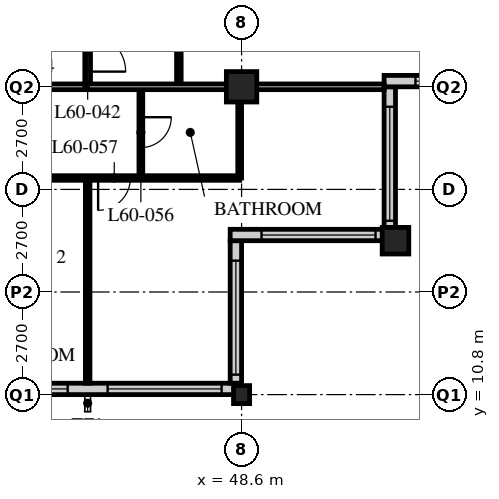
"""IFC4 building model, lengths in metres.
Left out: names, types, materials, properties, quantities, classifications, styles, units other than length and angle.
Written with IfcOpenShell. Run it as: python <this file> out.ifc"""

import sys

from ifc_helpers import new_model, si_unit, direction, frame, frame_2d, origin, origin_2d, place, context, subcontext, project, spatial, rectangle, hollow_rectangle, i_section, extrude, element, fill, save


model = new_model("IFC4")
c1 = context("Model", 3, precision=1e-05, world=origin(), true_north=direction((0.0, 1.0)))
c2 = subcontext(c1, "Body", "Model", "MODEL_VIEW")
j1 = project(units=[si_unit("LENGTHUNIT", "METRE"), si_unit("PLANEANGLEUNIT", "RADIAN")], contexts=[c1])
p1 = place(None, origin())
s1 = spatial("IfcSite", under=j1, at=p1, CompositionType="ELEMENT")
p2 = place(p1, origin())
s2 = spatial("IfcBuilding", under=s1, at=p2, CompositionType="ELEMENT")
p3 = place(p2, frame((0.0, 0.0, 231.6)))
s3 = spatial("IfcBuildingStorey", under=s2, at=p3, CompositionType="ELEMENT", Elevation=231.6)
p4 = place(p3, frame((48.6, 10.8, 0.0), z_axis=(0.0, 0.0, 1.0), x_axis=(1.0, 0.0, 0.0)))
e1 = element("IfcColumn", 1, at=p4, inside=s3, PredefinedType="COLUMN", context=c2, shape_type="SweptSolid", body=[
    extrude(i_section(OverallWidth=0.424, OverallDepth=0.475, WebThickness=0.048, FlangeThickness=0.077, FilletRadius=0.015, at=origin_2d()), origin(), (0.0, 0.0, 1.0), 3.6),
])
p5 = place(p3, frame((48.6, 18.9, 0.0), z_axis=(0.0, 0.0, 1.0), x_axis=(1.0, 0.0, 0.0)))
e2 = element("IfcColumn", 2, at=p5, inside=s3, PredefinedType="COLUMN", context=c2, shape_type="SweptSolid", body=[
    extrude(hollow_rectangle(XDim=0.8, YDim=0.8, WallThickness=0.08, at=origin_2d()), origin(), (0.0, 0.0, 1.0), 3.6),
])
p6 = place(p3, frame((52.65, 14.85, 0.0), z_axis=(0.0, 0.0, 1.0), x_axis=(1.0, 0.0, 0.0)))
e3 = element("IfcColumn", 3, at=p6, inside=s3, PredefinedType="COLUMN", context=c2, shape_type="SweptSolid", body=[
    extrude(hollow_rectangle(XDim=0.7, YDim=0.7, WallThickness=0.07, at=origin_2d()), origin(), (0.0, 0.0, 1.0), 3.6),
])
p7 = place(p3, frame((8.4, 10.95, 0.0), z_axis=(0.0, 0.0, 1.0), x_axis=(1.0, 0.0, 0.0)))
e4 = element("IfcWall", 4, at=p7, inside=s3, PredefinedType="SOLIDWALL", context=c2, shape_type="SweptSolid", body=[
    extrude(rectangle(XDim=40.2, YDim=0.3, at=frame_2d((20.1, 0.0))), origin(), (0.0, 0.0, 1.0), 2.35),
])
p8 = place(p7, frame((0.225, 0.0, 0.6)))
e5 = element("IfcOpeningElement", 5, at=p8, cuts=e4, PredefinedType="OPENING", context=c2, shape_type="SweptSolid", body=[
    extrude(rectangle(XDim=3.0, YDim=1.7, at=frame_2d((1.5, 0.85))), frame((0.0, 0.16, 0.0), z_axis=(0.0, -1.0, 0.0), x_axis=(1.0, 0.0, 0.0)), (0.0, 0.0, 1.0), 0.32),
])
p9 = place(p7, frame((4.275, 0.0, 0.6)))
e6 = element("IfcOpeningElement", 6, at=p9, cuts=e4, PredefinedType="OPENING", context=c2, shape_type="SweptSolid", body=[
    extrude(rectangle(XDim=3.0, YDim=1.7, at=frame_2d((1.5, 0.85))), frame((0.0, 0.16, 0.0), z_axis=(0.0, -1.0, 0.0), x_axis=(1.0, 0.0, 0.0)), (0.0, 0.0, 1.0), 0.32),
])
p10 = place(p7, frame((8.325, 0.0, 0.6)))
e7 = element("IfcOpeningElement", 7, at=p10, cuts=e4, PredefinedType="OPENING", context=c2, shape_type="SweptSolid", body=[
    extrude(rectangle(XDim=3.0, YDim=1.7, at=frame_2d((1.5, 0.85))), frame((0.0, 0.16, 0.0), z_axis=(0.0, -1.0, 0.0), x_axis=(1.0, 0.0, 0.0)), (0.0, 0.0, 1.0), 0.32),
])
p11 = place(p7, frame((12.375, 0.0, 0.6)))
e8 = element("IfcOpeningElement", 8, at=p11, cuts=e4, PredefinedType="OPENING", context=c2, shape_type="SweptSolid", body=[
    extrude(rectangle(XDim=3.0, YDim=1.7, at=frame_2d((1.5, 0.85))), frame((0.0, 0.16, 0.0), z_axis=(0.0, -1.0, 0.0), x_axis=(1.0, 0.0, 0.0)), (0.0, 0.0, 1.0), 0.32),
])
p12 = place(p7, frame((16.425, 0.0, 0.6)))
e9 = element("IfcOpeningElement", 9, at=p12, cuts=e4, PredefinedType="OPENING", context=c2, shape_type="SweptSolid", body=[
    extrude(rectangle(XDim=3.0, YDim=1.7, at=frame_2d((1.5, 0.85))), frame((0.0, 0.16, 0.0), z_axis=(0.0, -1.0, 0.0), x_axis=(1.0, 0.0, 0.0)), (0.0, 0.0, 1.0), 0.32),
])
p13 = place(p7, frame((20.475, 0.0, 0.6)))
e10 = element("IfcOpeningElement", 10, at=p13, cuts=e4, PredefinedType="OPENING", context=c2, shape_type="SweptSolid", body=[
    extrude(rectangle(XDim=3.0, YDim=1.7, at=frame_2d((1.5, 0.85))), frame((0.0, 0.16, 0.0), z_axis=(0.0, -1.0, 0.0), x_axis=(1.0, 0.0, 0.0)), (0.0, 0.0, 1.0), 0.32),
])
p14 = place(p7, frame((24.525, 0.0, 0.6)))
e11 = element("IfcOpeningElement", 11, at=p14, cuts=e4, PredefinedType="OPENING", context=c2, shape_type="SweptSolid", body=[
    extrude(rectangle(XDim=3.0, YDim=1.7, at=frame_2d((1.5, 0.85))), frame((0.0, 0.16, 0.0), z_axis=(0.0, -1.0, 0.0), x_axis=(1.0, 0.0, 0.0)), (0.0, 0.0, 1.0), 0.32),
])
p15 = place(p7, frame((28.575, 0.0, 0.6)))
e12 = element("IfcOpeningElement", 12, at=p15, cuts=e4, PredefinedType="OPENING", context=c2, shape_type="SweptSolid", body=[
    extrude(rectangle(XDim=3.0, YDim=1.7, at=frame_2d((1.5, 0.85))), frame((0.0, 0.16, 0.0), z_axis=(0.0, -1.0, 0.0), x_axis=(1.0, 0.0, 0.0)), (0.0, 0.0, 1.0), 0.32),
])
p16 = place(p7, frame((32.625, 0.0, 0.6)))
e13 = element("IfcOpeningElement", 13, at=p16, cuts=e4, PredefinedType="OPENING", context=c2, shape_type="SweptSolid", body=[
    extrude(rectangle(XDim=3.0, YDim=1.7, at=frame_2d((1.5, 0.85))), frame((0.0, 0.16, 0.0), z_axis=(0.0, -1.0, 0.0), x_axis=(1.0, 0.0, 0.0)), (0.0, 0.0, 1.0), 0.32),
])
p17 = place(p7, frame((36.675, 0.0, 0.6)))
e14 = element("IfcOpeningElement", 14, at=p17, cuts=e4, PredefinedType="OPENING", context=c2, shape_type="SweptSolid", body=[
    extrude(rectangle(XDim=3.0, YDim=1.7, at=frame_2d((1.5, 0.85))), frame((0.0, 0.16, 0.0), z_axis=(0.0, -1.0, 0.0), x_axis=(1.0, 0.0, 0.0)), (0.0, 0.0, 1.0), 0.32),
])
p18 = place(p3, frame((48.45, 11.1, 0.0), z_axis=(0.0, 0.0, 1.0), x_axis=(0.0, 1.0, 0.0)))
e15 = element("IfcWall", 15, at=p18, inside=s3, PredefinedType="SOLIDWALL", context=c2, shape_type="SweptSolid", body=[
    extrude(rectangle(XDim=3.75, YDim=0.3, at=frame_2d((1.875, 0.0))), origin(), (0.0, 0.0, 1.0), 2.35),
])
p19 = place(p18, frame((0.225, 0.0, 0.6)))
e16 = element("IfcOpeningElement", 16, at=p19, cuts=e15, PredefinedType="OPENING", context=c2, shape_type="SweptSolid", body=[
    extrude(rectangle(XDim=3.0, YDim=1.7, at=frame_2d((1.5, 0.85))), frame((0.0, 0.16, 0.0), z_axis=(0.0, -1.0, 0.0), x_axis=(1.0, 0.0, 0.0)), (0.0, 0.0, 1.0), 0.32),
])
p20 = place(p3, frame((48.3, 15.0, 0.0), z_axis=(0.0, 0.0, 1.0), x_axis=(1.0, 0.0, 0.0)))
e17 = element("IfcWall", 17, at=p20, inside=s3, PredefinedType="SOLIDWALL", context=c2, shape_type="SweptSolid", body=[
    extrude(rectangle(XDim=4.35, YDim=0.3, at=frame_2d((2.175, 0.0))), origin(), (0.0, 0.0, 1.0), 2.65),
])
p21 = place(p20, frame((0.825, 0.0, 0.6)))
e18 = element("IfcOpeningElement", 18, at=p21, cuts=e17, PredefinedType="OPENING", context=c2, shape_type="SweptSolid", body=[
    extrude(rectangle(XDim=3.0, YDim=1.7, at=frame_2d((1.5, 0.85))), frame((0.0, 0.16, 0.0), z_axis=(0.0, -1.0, 0.0), x_axis=(1.0, 0.0, 0.0)), (0.0, 0.0, 1.0), 0.32),
])
p22 = place(p3, frame((52.5, 15.15, 0.0), z_axis=(0.0, 0.0, 1.0), x_axis=(0.0, 1.0, 0.0)))
e19 = element("IfcWall", 19, at=p22, inside=s3, PredefinedType="SOLIDWALL", context=c2, shape_type="SweptSolid", body=[
    extrude(rectangle(XDim=3.75, YDim=0.3, at=frame_2d((1.875, 0.0))), origin(), (0.0, 0.0, 1.0), 2.65),
])
p23 = place(p22, frame((0.225, 0.0, 0.6)))
e20 = element("IfcOpeningElement", 20, at=p23, cuts=e19, PredefinedType="OPENING", context=c2, shape_type="SweptSolid", body=[
    extrude(rectangle(XDim=3.0, YDim=1.7, at=frame_2d((1.5, 0.85))), frame((0.0, 0.16, 0.0), z_axis=(0.0, -1.0, 0.0), x_axis=(1.0, 0.0, 0.0)), (0.0, 0.0, 1.0), 0.32),
])
p24 = place(p3, frame((52.35, 19.05, 0.0), z_axis=(0.0, 0.0, 1.0), x_axis=(1.0, 0.0, 0.0)))
e21 = element("IfcWall", 21, at=p24, inside=s3, PredefinedType="SOLIDWALL", context=c2, shape_type="SweptSolid", body=[
    extrude(rectangle(XDim=4.35, YDim=0.3, at=frame_2d((2.175, 0.0))), origin(), (0.0, 0.0, 1.0), 2.35),
])
p25 = place(p24, frame((0.825, 0.0, 0.6)))
e22 = element("IfcOpeningElement", 22, at=p25, cuts=e21, PredefinedType="OPENING", context=c2, shape_type="SweptSolid", body=[
    extrude(rectangle(XDim=3.0, YDim=1.7, at=frame_2d((1.5, 0.85))), frame((0.0, 0.16, 0.0), z_axis=(0.0, -1.0, 0.0), x_axis=(1.0, 0.0, 0.0)), (0.0, 0.0, 1.0), 0.32),
])
p26 = place(p3, frame((8.1, 18.9, 0.0), z_axis=(0.0, 0.0, 1.0), x_axis=(1.0, 0.0, 0.0)))
e23 = element("IfcWall", 23, at=p26, inside=s3, PredefinedType="PARTITIONING", context=c2, shape_type="SweptSolid", body=[
    extrude(rectangle(XDim=36.45, YDim=0.15, at=frame_2d((18.225, 0.0))), origin(), (0.0, 0.0, 1.0), 2.35),
])
p27 = place(p26, frame((4.45, 0.0, 0.0)))
e24 = element("IfcOpeningElement", 24, at=p27, cuts=e23, PredefinedType="OPENING", context=c2, shape_type="SweptSolid", body=[
    extrude(rectangle(XDim=1.0, YDim=2.1, at=frame_2d((0.5, 1.05))), frame((0.0, 0.085, 0.0), z_axis=(0.0, -1.0, 0.0), x_axis=(1.0, 0.0, 0.0)), (0.0, 0.0, 1.0), 0.17),
])
p28 = place(p26, frame((17.1, 0.0, 0.0)))
e25 = element("IfcOpeningElement", 25, at=p28, cuts=e23, PredefinedType="OPENING", context=c2, shape_type="SweptSolid", body=[
    extrude(rectangle(XDim=1.0, YDim=2.1, at=frame_2d((0.5, 1.05))), frame((0.0, 0.085, 0.0), z_axis=(0.0, -1.0, 0.0), x_axis=(1.0, 0.0, 0.0)), (0.0, 0.0, 1.0), 0.17),
])
p29 = place(p26, frame((29.05, 0.0, 0.0)))
e26 = element("IfcOpeningElement", 26, at=p29, cuts=e23, PredefinedType="OPENING", context=c2, shape_type="SweptSolid", body=[
    extrude(rectangle(XDim=1.0, YDim=2.1, at=frame_2d((0.5, 1.05))), frame((0.0, 0.085, 0.0), z_axis=(0.0, -1.0, 0.0), x_axis=(1.0, 0.0, 0.0)), (0.0, 0.0, 1.0), 0.17),
])
p30 = place(p26, frame((2.625, 0.0, 0.0)))
e27 = element("IfcOpeningElement", 27, at=p30, cuts=e23, PredefinedType="OPENING", context=c2, shape_type="SweptSolid", body=[
    extrude(rectangle(XDim=1.0, YDim=2.1, at=frame_2d((0.5, 1.05))), frame((0.0, 0.085, 0.0), z_axis=(0.0, -1.0, 0.0), x_axis=(1.0, 0.0, 0.0)), (0.0, 0.0, 1.0), 0.17),
])
p31 = place(p26, frame((33.925, 0.0, 0.0)))
e28 = element("IfcOpeningElement", 28, at=p31, cuts=e23, PredefinedType="OPENING", context=c2, shape_type="SweptSolid", body=[
    extrude(rectangle(XDim=1.0, YDim=2.1, at=frame_2d((0.5, 1.05))), frame((0.0, 0.085, 0.0), z_axis=(0.0, -1.0, 0.0), x_axis=(1.0, 0.0, 0.0)), (0.0, 0.0, 1.0), 0.17),
])
p32 = place(p3, frame((44.55, 18.9, 0.0), z_axis=(0.0, 0.0, 1.0), x_axis=(0.0, 1.0, 0.0)))
e29 = element("IfcWall", 29, at=p32, inside=s3, PredefinedType="PARTITIONING", context=c2, shape_type="SweptSolid", body=[
    extrude(rectangle(XDim=24.3, YDim=0.15, at=frame_2d((12.15, 0.0))), origin(), (0.0, 0.0, 1.0), 3.35),
])
p33 = place(p32, frame((0.4, 0.0, 0.0)))
e30 = element("IfcOpeningElement", 30, at=p33, cuts=e29, PredefinedType="OPENING", context=c2, shape_type="SweptSolid", body=[
    extrude(rectangle(XDim=1.0, YDim=2.1, at=frame_2d((0.5, 1.05))), frame((0.0, 0.085, 0.0), z_axis=(0.0, -1.0, 0.0), x_axis=(1.0, 0.0, 0.0)), (0.0, 0.0, 1.0), 0.17),
])
p34 = place(p32, frame((16.6, 0.0, 0.0)))
e31 = element("IfcOpeningElement", 31, at=p34, cuts=e29, PredefinedType="OPENING", context=c2, shape_type="SweptSolid", body=[
    extrude(rectangle(XDim=1.0, YDim=2.1, at=frame_2d((0.5, 1.05))), frame((0.0, 0.085, 0.0), z_axis=(0.0, -1.0, 0.0), x_axis=(1.0, 0.0, 0.0)), (0.0, 0.0, 1.0), 0.17),
])
p35 = place(p3, frame((46.95, 18.9, 0.0), z_axis=(0.0, 0.0, 1.0), x_axis=(0.0, 1.0, 0.0)))
e32 = element("IfcWall", 32, at=p35, inside=s3, PredefinedType="PARTITIONING", context=c2, shape_type="SweptSolid", body=[
    extrude(rectangle(XDim=24.3, YDim=0.12, at=frame_2d((12.15, 0.0))), origin(), (0.0, 0.0, 1.0), 3.35),
])
p36 = place(p35, frame((0.975, 0.0, 0.0)))
e33 = element("IfcOpeningElement", 33, at=p36, cuts=e32, PredefinedType="OPENING", context=c2, shape_type="SweptSolid", body=[
    extrude(rectangle(XDim=0.85, YDim=2.1, at=frame_2d((0.425, 1.05))), frame((0.0, 0.07, 0.0), z_axis=(0.0, -1.0, 0.0), x_axis=(1.0, 0.0, 0.0)), (0.0, 0.0, 1.0), 0.14),
])
p37 = place(p35, frame((8.425, 0.0, 0.0)))
e34 = element("IfcOpeningElement", 34, at=p37, cuts=e32, PredefinedType="OPENING", context=c2, shape_type="SweptSolid", body=[
    extrude(rectangle(XDim=0.85, YDim=2.1, at=frame_2d((0.425, 1.05))), frame((0.0, 0.07, 0.0), z_axis=(0.0, -1.0, 0.0), x_axis=(1.0, 0.0, 0.0)), (0.0, 0.0, 1.0), 0.14),
])
p38 = place(p35, frame((12.475, 0.0, 0.0)))
e35 = element("IfcOpeningElement", 35, at=p38, cuts=e32, PredefinedType="OPENING", context=c2, shape_type="SweptSolid", body=[
    extrude(rectangle(XDim=0.85, YDim=2.1, at=frame_2d((0.425, 1.05))), frame((0.0, 0.07, 0.0), z_axis=(0.0, -1.0, 0.0), x_axis=(1.0, 0.0, 0.0)), (0.0, 0.0, 1.0), 0.14),
])
p39 = place(p35, frame((17.175, 0.0, 0.0)))
e36 = element("IfcOpeningElement", 36, at=p39, cuts=e32, PredefinedType="OPENING", context=c2, shape_type="SweptSolid", body=[
    extrude(rectangle(XDim=0.85, YDim=2.1, at=frame_2d((0.425, 1.05))), frame((0.0, 0.07, 0.0), z_axis=(0.0, -1.0, 0.0), x_axis=(1.0, 0.0, 0.0)), (0.0, 0.0, 1.0), 0.14),
])
p40 = place(p35, frame((20.575, 0.0, 0.0)))
e37 = element("IfcOpeningElement", 37, at=p40, cuts=e32, PredefinedType="OPENING", context=c2, shape_type="SweptSolid", body=[
    extrude(rectangle(XDim=0.85, YDim=2.1, at=frame_2d((0.425, 1.05))), frame((0.0, 0.07, 0.0), z_axis=(0.0, -1.0, 0.0), x_axis=(1.0, 0.0, 0.0)), (0.0, 0.0, 1.0), 0.14),
])
p41 = place(p3, frame((40.5, 16.5, 0.0), z_axis=(0.0, 0.0, 1.0), x_axis=(1.0, 0.0, 0.0)))
e38 = element("IfcWall", 38, at=p41, inside=s3, PredefinedType="PARTITIONING", context=c2, shape_type="SweptSolid", body=[
    extrude(rectangle(XDim=8.05, YDim=0.12, at=frame_2d((4.025, 0.0))), origin(), (0.0, 0.0, 1.0), 3.35),
])
p42 = place(p41, frame((0.475, 0.0, 0.0)))
e39 = element("IfcOpeningElement", 39, at=p42, cuts=e38, PredefinedType="OPENING", context=c2, shape_type="SweptSolid", body=[
    extrude(rectangle(XDim=0.85, YDim=2.1, at=frame_2d((0.425, 1.05))), frame((0.0, 0.07, 0.0), z_axis=(0.0, -1.0, 0.0), x_axis=(1.0, 0.0, 0.0)), (0.0, 0.0, 1.0), 0.14),
])
p43 = place(p41, frame((4.325, 0.0, 0.0)))
e40 = element("IfcOpeningElement", 40, at=p43, cuts=e38, PredefinedType="OPENING", context=c2, shape_type="SweptSolid", body=[
    extrude(rectangle(XDim=0.85, YDim=2.1, at=frame_2d((0.425, 1.05))), frame((0.0, 0.07, 0.0), z_axis=(0.0, -1.0, 0.0), x_axis=(1.0, 0.0, 0.0)), (0.0, 0.0, 1.0), 0.14),
])
p44 = place(p3, frame((45.95, 18.9, 0.0), z_axis=(0.0, 0.0, 1.0), x_axis=(0.0, -1.0, 0.0)))
e41 = element("IfcWall", 41, at=p44, inside=s3, PredefinedType="PARTITIONING", context=c2, shape_type="SweptSolid", body=[
    extrude(rectangle(XDim=2.4, YDim=0.1, at=frame_2d((1.2, 0.0))), origin(), (0.0, 0.0, 1.0), 3.35),
])
p45 = place(p44, frame((0.8, 0.0, 0.0)))
e42 = element("IfcOpeningElement", 42, at=p45, cuts=e41, PredefinedType="OPENING", context=c2, shape_type="SweptSolid", body=[
    extrude(rectangle(XDim=0.8, YDim=2.1, at=frame_2d((0.4, 1.05))), frame((0.0, 0.06, 0.0), z_axis=(0.0, -1.0, 0.0), x_axis=(1.0, 0.0, 0.0)), (0.0, 0.0, 1.0), 0.12),
])
p46 = place(p3, frame((48.55, 18.9, 0.0), z_axis=(0.0, 0.0, 1.0), x_axis=(0.0, -1.0, 0.0)))
e43 = element("IfcWall", 43, at=p46, inside=s3, PredefinedType="PARTITIONING", context=c2, shape_type="SweptSolid", body=[
    extrude(rectangle(XDim=2.4, YDim=0.1, at=frame_2d((1.2, 0.0))), origin(), (0.0, 0.0, 1.0), 2.35),
])
p47 = place(p3, frame((44.55, 16.5, 0.0), z_axis=(0.0, 0.0, 1.0), x_axis=(0.0, -1.0, 0.0)))
e44 = element("IfcWall", 44, at=p47, inside=s3, PredefinedType="PARTITIONING", context=c2, shape_type="SweptSolid", body=[
    extrude(rectangle(XDim=5.4, YDim=0.12, at=frame_2d((2.7, 0.0))), origin(), (0.0, 0.0, 1.0), 3.35),
])
p48 = place(p3, frame((44.55, 18.9, 0.0), z_axis=(0.0, 0.0, 1.0), x_axis=(1.0, 0.0, 0.0)))
e45 = element("IfcWall", 45, at=p48, inside=s3, PredefinedType="PARTITIONING", context=c2, shape_type="SweptSolid", body=[
    extrude(rectangle(XDim=7.8, YDim=0.15, at=frame_2d((3.9, 0.0))), origin(), (0.0, 0.0, 1.0), 2.35),
])
p49 = place(p16, origin())
e46 = element("IfcWindow", 46, at=p49, inside=s3, PartitioningType="SINGLE_PANEL", PredefinedType="WINDOW", context=c2, shape_type="SweptSolid", body=[
    extrude(rectangle(XDim=3.0, YDim=1.7, at=frame_2d((1.5, 0.85))), frame((0.0, 0.03, 0.0), z_axis=(0.0, -1.0, 0.0), x_axis=(1.0, 0.0, 0.0)), (0.0, 0.0, 1.0), 0.06),
])
fill(e13, e46)
p50 = place(p17, origin())
e47 = element("IfcWindow", 47, at=p50, inside=s3, PartitioningType="SINGLE_PANEL", PredefinedType="WINDOW", context=c2, shape_type="SweptSolid", body=[
    extrude(rectangle(XDim=3.0, YDim=1.7, at=frame_2d((1.5, 0.85))), frame((0.0, 0.03, 0.0), z_axis=(0.0, -1.0, 0.0), x_axis=(1.0, 0.0, 0.0)), (0.0, 0.0, 1.0), 0.06),
])
fill(e14, e47)
p51 = place(p19, origin())
e48 = element("IfcWindow", 48, at=p51, inside=s3, PartitioningType="SINGLE_PANEL", PredefinedType="WINDOW", context=c2, shape_type="SweptSolid", body=[
    extrude(rectangle(XDim=3.0, YDim=1.7, at=frame_2d((1.5, 0.85))), frame((0.0, 0.03, 0.0), z_axis=(0.0, -1.0, 0.0), x_axis=(1.0, 0.0, 0.0)), (0.0, 0.0, 1.0), 0.06),
])
fill(e16, e48)
p52 = place(p21, origin())
e49 = element("IfcWindow", 49, at=p52, inside=s3, PartitioningType="SINGLE_PANEL", PredefinedType="WINDOW", context=c2, shape_type="SweptSolid", body=[
    extrude(rectangle(XDim=3.0, YDim=1.7, at=frame_2d((1.5, 0.85))), frame((0.0, 0.03, 0.0), z_axis=(0.0, -1.0, 0.0), x_axis=(1.0, 0.0, 0.0)), (0.0, 0.0, 1.0), 0.06),
])
fill(e18, e49)
p53 = place(p23, origin())
e50 = element("IfcWindow", 50, at=p53, inside=s3, PartitioningType="SINGLE_PANEL", PredefinedType="WINDOW", context=c2, shape_type="SweptSolid", body=[
    extrude(rectangle(XDim=3.0, YDim=1.7, at=frame_2d((1.5, 0.85))), frame((0.0, 0.03, 0.0), z_axis=(0.0, -1.0, 0.0), x_axis=(1.0, 0.0, 0.0)), (0.0, 0.0, 1.0), 0.06),
])
fill(e20, e50)
p54 = place(p25, origin())
e51 = element("IfcWindow", 51, at=p54, inside=s3, PartitioningType="SINGLE_PANEL", PredefinedType="WINDOW", context=c2, shape_type="SweptSolid", body=[
    extrude(rectangle(XDim=3.0, YDim=1.7, at=frame_2d((1.5, 0.85))), frame((0.0, 0.03, 0.0), z_axis=(0.0, -1.0, 0.0), x_axis=(1.0, 0.0, 0.0)), (0.0, 0.0, 1.0), 0.06),
])
fill(e22, e51)
p55 = place(p33, origin())
e52 = element("IfcDoor", 52, at=p55, inside=s3, OperationType="SINGLE_SWING_RIGHT", PredefinedType="DOOR", context=c2, shape_type="SweptSolid", body=[
    extrude(rectangle(XDim=1.0, YDim=2.1, at=frame_2d((0.5, 1.05))), frame((0.0, 0.025, 0.0), z_axis=(0.0, -1.0, 0.0), x_axis=(1.0, 0.0, 0.0)), (0.0, 0.0, 1.0), 0.05),
])
fill(e30, e52)
p56 = place(p45, origin())
e53 = element("IfcDoor", 53, at=p56, inside=s3, OperationType="SINGLE_SWING_LEFT", PredefinedType="DOOR", context=c2, shape_type="SweptSolid", body=[
    extrude(rectangle(XDim=0.8, YDim=2.1, at=frame_2d((0.4, 1.05))), frame((0.0, 0.025, 0.0), z_axis=(0.0, -1.0, 0.0), x_axis=(1.0, 0.0, 0.0)), (0.0, 0.0, 1.0), 0.05),
])
fill(e42, e53)
p57 = place(p43, origin())
e54 = element("IfcDoor", 54, at=p57, inside=s3, OperationType="SINGLE_SWING_RIGHT", PredefinedType="DOOR", context=c2, shape_type="SweptSolid", body=[
    extrude(rectangle(XDim=0.85, YDim=2.1, at=frame_2d((0.425, 1.05))), frame((0.0, 0.025, 0.0), z_axis=(0.0, -1.0, 0.0), x_axis=(1.0, 0.0, 0.0)), (0.0, 0.0, 1.0), 0.05),
])
fill(e40, e54)
save(model, sys.argv[1])
